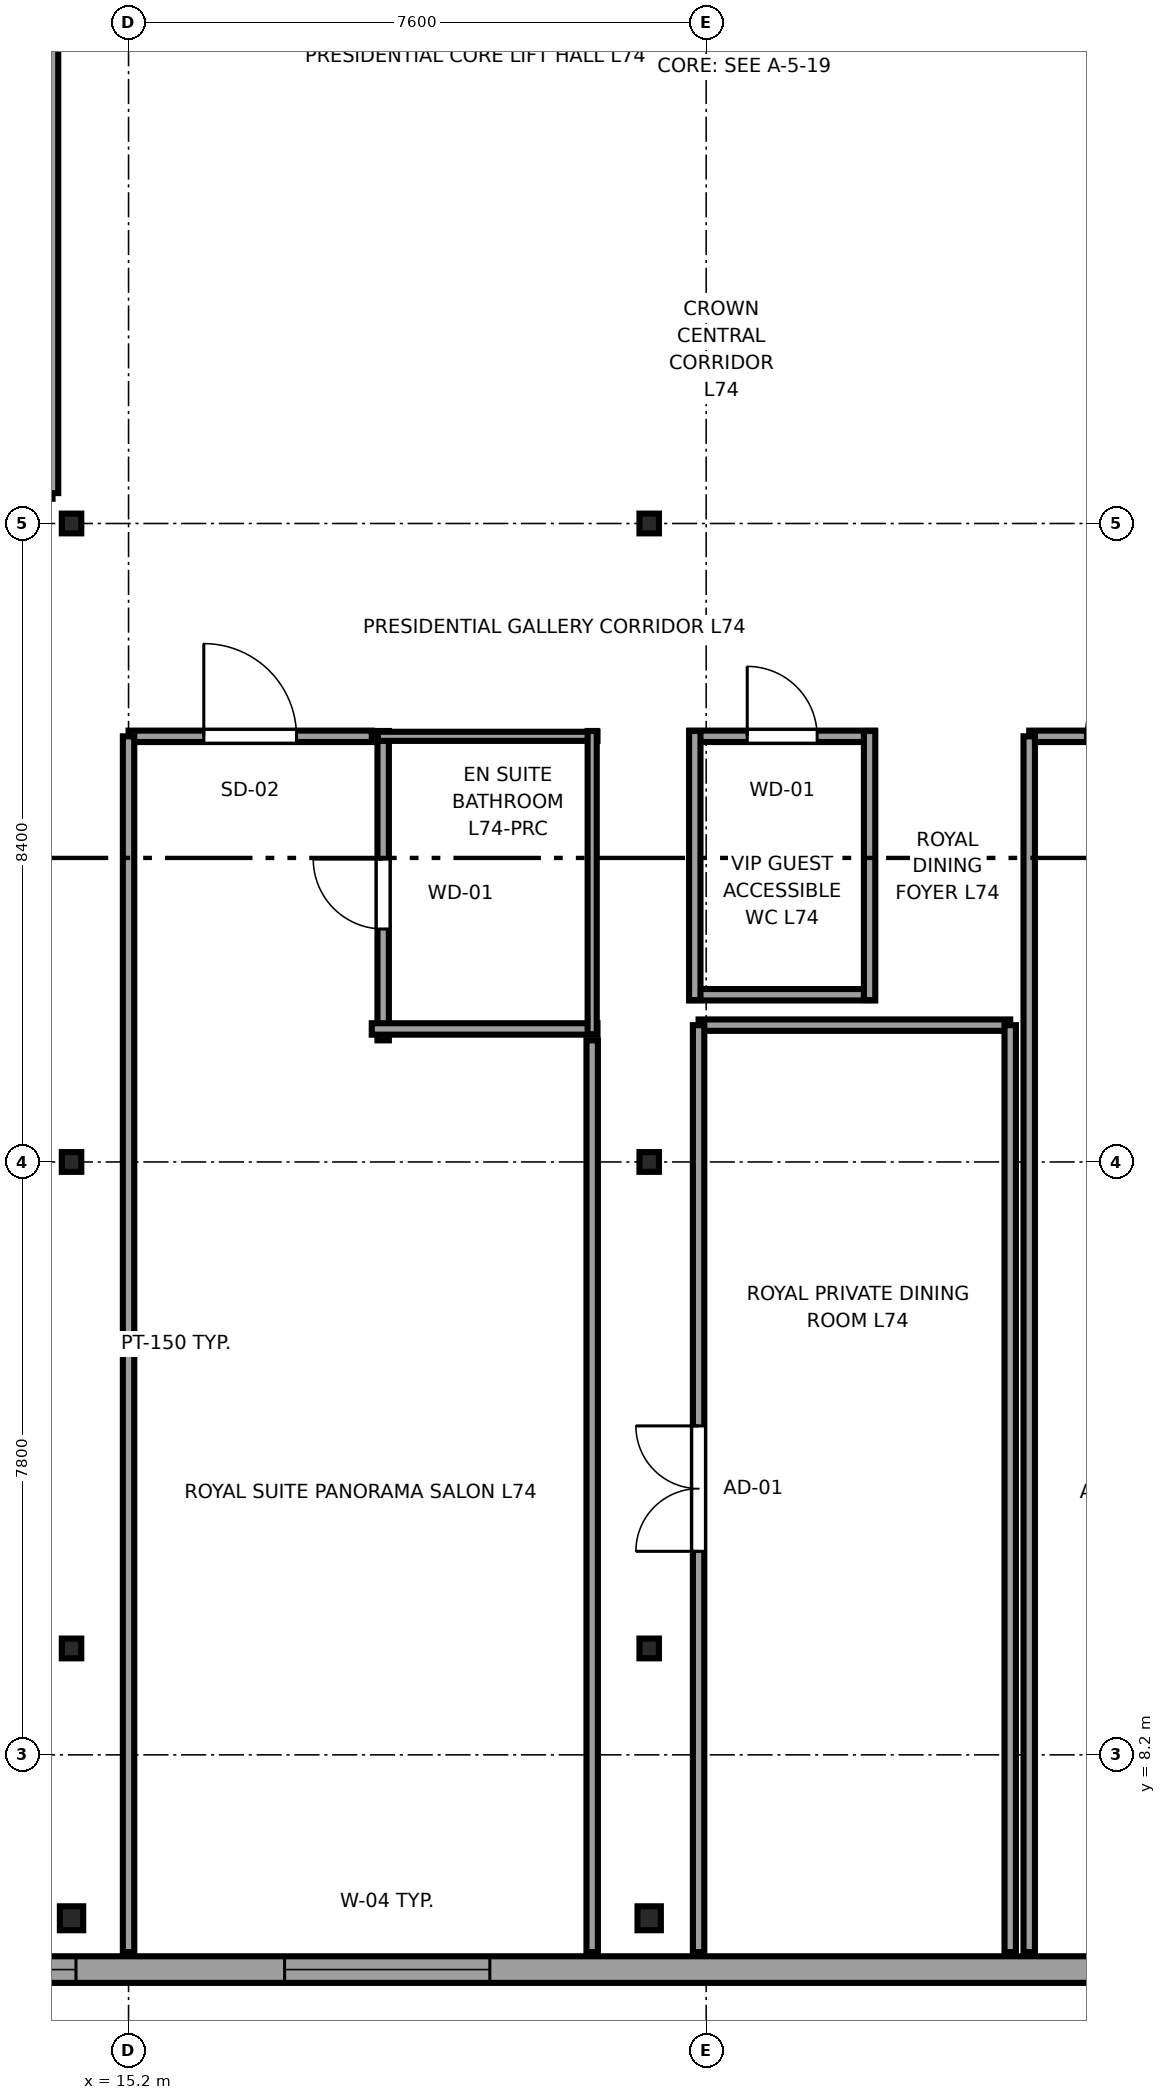
"""IFC4 building model, lengths in metres.
Left out: names, types, materials, properties, quantities, classifications, styles, units other than length and angle.
Written with IfcOpenShell. Run it as: python <this file> out.ifc"""

import sys

from ifc_helpers import new_model, si_unit, direction, frame, frame_2d, origin, origin_2d, place, context, subcontext, project, spatial, rectangle, i_section, extrude, source, transform, mapped, element, fill, save


model = new_model("IFC4")
c1 = context("Model", 3, precision=1e-05, world=origin(), true_north=direction((0.0, 1.0)))
c2 = subcontext(c1, "Body", "Model", "MODEL_VIEW")
j1 = project(units=[si_unit("LENGTHUNIT", "METRE"), si_unit("PLANEANGLEUNIT", "RADIAN")], contexts=[c1])
p1 = place(None, origin())
s1 = spatial("IfcSite", under=j1, at=p1, CompositionType="ELEMENT")
p2 = place(p1, origin())
s2 = spatial("IfcBuilding", under=s1, at=p2, CompositionType="ELEMENT")
p3 = place(p2, frame((0.0, 0.0, 278.6)))
s3 = spatial("IfcBuildingStorey", under=s2, at=p3, CompositionType="ELEMENT", Elevation=278.6)
m1 = source(origin(), c2, "Body", "SweptSolid", [
    extrude(i_section(OverallWidth=0.307, OverallDepth=0.315, WebThickness=0.012, FlangeThickness=0.019, FilletRadius=0.017, at=origin_2d()), origin(), (0.0, 0.0, 1.0), 3.55),
])
p4 = place(p3, frame((14.45, 6.05, 0.0), z_axis=(0.0, 0.0, 1.0), x_axis=(1.0, 0.0, 0.0)))
e1 = element("IfcColumn", 1, at=p4, inside=s3, PredefinedType="COLUMN", context=c2, shape_type="MappedRepresentation", body=[
    mapped(m1, transform((0.0, 0.0, 0.0), x_axis=(1.0, 0.0, 0.0), y_axis=(0.0, 1.0, 0.0), z_axis=(0.0, 0.0, 1.0), scale=1.0)),
])
m2 = source(origin(), c2, "Body", "SweptSolid", [
    extrude(i_section(OverallWidth=0.256, OverallDepth=0.26, WebThickness=0.01, FlangeThickness=0.017, FilletRadius=0.014, at=origin_2d()), origin(), (0.0, 0.0, 1.0), 3.55),
])
for number, where, z_axis, x_axis in (
    (2, (14.45, 9.6, 0.0), (0.0, 0.0, 1.0), (1.0, 0.0, 0.0)),
    (3, (14.45, 16.0, 0.0), (0.0, 0.0, 1.0), (1.0, 0.0, 0.0)),
    (4, (14.45, 24.4, 0.0), (0.0, 0.0, 1.0), (1.0, 0.0, 0.0)),
):
    element("IfcColumn", number, at=place(p3, frame(where, z_axis=z_axis, x_axis=x_axis)), inside=s3, PredefinedType="COLUMN", context=c2, shape_type="MappedRepresentation", body=[
        mapped(m2, transform((0.0, 0.0, 0.0), x_axis=(1.0, 0.0, 0.0), y_axis=(0.0, 1.0, 0.0), z_axis=(0.0, 0.0, 1.0), scale=1.0)),
    ])
p5 = place(p3, frame((22.05, 6.05, 0.0), z_axis=(0.0, 0.0, 1.0), x_axis=(1.0, 0.0, 0.0)))
e5 = element("IfcColumn", 5, at=p5, inside=s3, PredefinedType="COLUMN", context=c2, shape_type="MappedRepresentation", body=[
    mapped(m1, transform((0.0, 0.0, 0.0), x_axis=(1.0, 0.0, 0.0), y_axis=(0.0, 1.0, 0.0), z_axis=(0.0, 0.0, 1.0), scale=1.0)),
])
for number, where, z_axis, x_axis in (
    (6, (22.05, 9.6, 0.0), (0.0, 0.0, 1.0), (1.0, 0.0, 0.0)),
    (7, (22.05, 16.0, 0.0), (0.0, 0.0, 1.0), (1.0, 0.0, 0.0)),
    (8, (22.05, 24.4, 0.0), (0.0, 0.0, 1.0), (1.0, 0.0, 0.0)),
):
    element("IfcColumn", number, at=place(p3, frame(where, z_axis=z_axis, x_axis=x_axis)), inside=s3, PredefinedType="COLUMN", context=c2, shape_type="MappedRepresentation", body=[
        mapped(m2, transform((0.0, 0.0, 0.0), x_axis=(1.0, 0.0, 0.0), y_axis=(0.0, 1.0, 0.0), z_axis=(0.0, 0.0, 1.0), scale=1.0)),
    ])
p6 = place(p3, frame((7.017, 5.375, 0.0), z_axis=(0.0, 0.0, 1.0), x_axis=(1.0, 0.0, 0.0)))
e9 = element("IfcWall", 9, at=p6, inside=s3, PredefinedType="SOLIDWALL", context=c2, shape_type="SweptSolid", body=[
    extrude(rectangle(XDim=27.566, YDim=0.35, at=frame_2d((13.783, 0.0))), origin(), (0.0, 0.0, 1.0), 3.33),
])
p7 = place(p6, frame((0.897, 0.0, 0.68)))
e10 = element("IfcOpeningElement", 10, at=p7, cuts=e9, PredefinedType="OPENING", context=c2, shape_type="SweptSolid", body=[
    extrude(rectangle(XDim=2.7, YDim=1.95, at=frame_2d((1.35, 0.975))), frame((0.0, 0.185, 0.0), z_axis=(0.0, -1.0, 0.0), x_axis=(1.0, 0.0, 0.0)), (0.0, 0.0, 1.0), 0.37),
])
p8 = place(p6, frame((4.791, 0.0, 0.68)))
e11 = element("IfcOpeningElement", 11, at=p8, cuts=e9, PredefinedType="OPENING", context=c2, shape_type="SweptSolid", body=[
    extrude(rectangle(XDim=2.7, YDim=1.95, at=frame_2d((1.35, 0.975))), frame((0.0, 0.185, 0.0), z_axis=(0.0, -1.0, 0.0), x_axis=(1.0, 0.0, 0.0)), (0.0, 0.0, 1.0), 0.37),
])
p9 = place(p6, frame((10.236, 0.0, 0.68)))
e12 = element("IfcOpeningElement", 12, at=p9, cuts=e9, PredefinedType="OPENING", context=c2, shape_type="SweptSolid", body=[
    extrude(rectangle(XDim=2.7, YDim=1.95, at=frame_2d((1.35, 0.975))), frame((0.0, 0.185, 0.0), z_axis=(0.0, -1.0, 0.0), x_axis=(1.0, 0.0, 0.0)), (0.0, 0.0, 1.0), 0.37),
])
p10 = place(p6, frame((22.368, 0.0, 0.68)))
e13 = element("IfcOpeningElement", 13, at=p10, cuts=e9, PredefinedType="OPENING", context=c2, shape_type="SweptSolid", body=[
    extrude(rectangle(XDim=2.7, YDim=1.95, at=frame_2d((1.35, 0.975))), frame((0.0, 0.185, 0.0), z_axis=(0.0, -1.0, 0.0), x_axis=(1.0, 0.0, 0.0)), (0.0, 0.0, 1.0), 0.37),
])
p11 = place(p3, frame((18.55, 17.6, 0.0), z_axis=(0.0, 0.0, 1.0), x_axis=(0.0, 1.0, 0.0)))
e14 = element("IfcWall", 14, at=p11, inside=s3, PredefinedType="PARTITIONING", context=c2, shape_type="SweptSolid", body=[
    extrude(rectangle(XDim=4.07, YDim=0.15, at=frame_2d((2.035, 0.0))), origin(), (0.0, 0.0, 1.0), 3.33),
])
p12 = place(p11, frame((1.465, 0.0, 0.0)))
e15 = element("IfcOpeningElement", 15, at=p12, cuts=e14, PredefinedType="OPENING", context=c2, shape_type="SweptSolid", body=[
    extrude(rectangle(XDim=0.92, YDim=2.01, at=frame_2d((0.46, 1.005))), frame((0.0, 0.085, 0.0), z_axis=(0.0, -1.0, 0.0), x_axis=(1.0, 0.0, 0.0)), (0.0, 0.0, 1.0), 0.17),
])
p13 = place(p3, frame((18.4, 17.75, 0.0), z_axis=(0.0, 0.0, 1.0), x_axis=(1.0, 0.0, 0.0)))
e16 = element("IfcWall", 16, at=p13, inside=s3, PredefinedType="PARTITIONING", context=c2, shape_type="SweptSolid", body=[
    extrude(rectangle(XDim=2.97, YDim=0.15, at=frame_2d((1.485, 0.0))), origin(), (0.0, 0.0, 1.0), 3.33),
])
p14 = place(p3, frame((18.48, 21.6, 0.0), z_axis=(0.0, 0.0, 1.0), x_axis=(1.0, 0.0, 0.0)))
e17 = element("IfcWall", 17, at=p14, inside=s3, PredefinedType="PLUMBINGWALL", context=c2, shape_type="SweptSolid", body=[
    extrude(rectangle(XDim=2.89, YDim=0.12, at=frame_2d((1.445, 0.0))), origin(), (0.0, 0.0, 1.0), 3.33),
])
p15 = place(p3, frame((21.3, 17.68, 0.0), z_axis=(0.0, 0.0, 1.0), x_axis=(0.0, 1.0, 0.0)))
e18 = element("IfcWall", 18, at=p15, inside=s3, PredefinedType="PLUMBINGWALL", context=c2, shape_type="SweptSolid", body=[
    extrude(rectangle(XDim=3.99, YDim=0.12, at=frame_2d((1.995, 0.0))), origin(), (0.0, 0.0, 1.0), 3.33),
])
p16 = place(p3, frame((15.2, 21.6, 0.0), z_axis=(0.0, 0.0, 1.0), x_axis=(1.0, 0.0, 0.0)))
e19 = element("IfcWall", 19, at=p16, inside=s3, PredefinedType="PARTITIONING", context=c2, shape_type="SweptSolid", body=[
    extrude(rectangle(XDim=3.2, YDim=0.15, at=frame_2d((1.6, 0.0))), origin(), (0.0, 0.0, 1.0), 3.33),
])
p17 = place(p16, frame((0.99, 0.0, 0.0)))
e20 = element("IfcOpeningElement", 20, at=p17, cuts=e19, PredefinedType="OPENING", context=c2, shape_type="SweptSolid", body=[
    extrude(rectangle(XDim=1.22, YDim=2.08, at=frame_2d((0.61, 1.04))), frame((0.0, 0.085, 0.0), z_axis=(0.0, -1.0, 0.0), x_axis=(1.0, 0.0, 0.0)), (0.0, 0.0, 1.0), 0.17),
])
p18 = place(p3, frame((21.3, 5.605, 0.0), z_axis=(0.0, 0.0, 1.0), x_axis=(0.0, 1.0, 0.0)))
e21 = element("IfcWall", 21, at=p18, inside=s3, PredefinedType="PARTITIONING", context=c2, shape_type="SweptSolid", body=[
    extrude(rectangle(XDim=11.995, YDim=0.15, at=frame_2d((5.998, 0.0))), origin(), (0.0, 0.0, 1.0), 3.33),
])
p19 = place(p3, frame((15.2, 5.605, 0.0), z_axis=(0.0, 0.0, 1.0), x_axis=(0.0, 1.0, 0.0)))
e22 = element("IfcWall", 22, at=p19, inside=s3, PredefinedType="PARTITIONING", context=c2, shape_type="SweptSolid", body=[
    extrude(rectangle(XDim=15.995, YDim=0.15, at=frame_2d((7.998, 0.0))), origin(), (0.0, 0.0, 1.0), 3.33),
])
p20 = place(p3, frame((22.7, 17.8, 0.0), z_axis=(0.0, 0.0, 1.0), x_axis=(1.0, 0.0, 0.0)))
e23 = element("IfcWall", 23, at=p20, inside=s3, PredefinedType="PARTITIONING", context=c2, shape_type="SweptSolid", body=[
    extrude(rectangle(XDim=4.1, YDim=0.15, at=frame_2d((2.05, 0.0))), origin(), (0.0, 0.0, 1.0), 3.33),
])
p21 = place(p3, frame((22.7, 5.605, 0.0), z_axis=(0.0, 0.0, 1.0), x_axis=(0.0, 1.0, 0.0)))
e24 = element("IfcWall", 24, at=p21, inside=s3, PredefinedType="PARTITIONING", context=c2, shape_type="SweptSolid", body=[
    extrude(rectangle(XDim=12.195, YDim=0.15, at=frame_2d((6.098, 0.0))), origin(), (0.0, 0.0, 1.0), 3.33),
])
p22 = place(p21, frame((5.272, 0.0, 0.0)))
e25 = element("IfcOpeningElement", 25, at=p22, cuts=e24, PredefinedType="OPENING", context=c2, shape_type="SweptSolid", body=[
    extrude(rectangle(XDim=1.65, YDim=2.15, at=frame_2d((0.825, 1.075))), frame((0.0, 0.085, 0.0), z_axis=(0.0, -1.0, 0.0), x_axis=(1.0, 0.0, 0.0)), (0.0, 0.0, 1.0), 0.17),
])
p23 = place(p3, frame((26.8, 5.605, 0.0), z_axis=(0.0, 0.0, 1.0), x_axis=(0.0, 1.0, 0.0)))
e26 = element("IfcWall", 26, at=p23, inside=s3, PredefinedType="PARTITIONING", context=c2, shape_type="SweptSolid", body=[
    extrude(rectangle(XDim=12.195, YDim=0.15, at=frame_2d((6.098, 0.0))), origin(), (0.0, 0.0, 1.0), 3.33),
])
p24 = place(p3, frame((27.05, 21.6, 0.0), z_axis=(0.0, 0.0, 1.0), x_axis=(1.0, 0.0, 0.0)))
e27 = element("IfcWall", 27, at=p24, inside=s3, PredefinedType="PARTITIONING", context=c2, shape_type="SweptSolid", body=[
    extrude(rectangle(XDim=2.7, YDim=0.15, at=frame_2d((1.35, 0.0))), origin(), (0.0, 0.0, 1.0), 3.33),
])
p25 = place(p24, frame((0.74, 0.0, 0.0)))
e28 = element("IfcOpeningElement", 28, at=p25, cuts=e27, PredefinedType="OPENING", context=c2, shape_type="SweptSolid", body=[
    extrude(rectangle(XDim=1.22, YDim=2.08, at=frame_2d((0.61, 1.04))), frame((0.0, 0.085, 0.0), z_axis=(0.0, -1.0, 0.0), x_axis=(1.0, 0.0, 0.0)), (0.0, 0.0, 1.0), 0.17),
])
p26 = place(p3, frame((27.05, 5.605, 0.0), z_axis=(0.0, 0.0, 1.0), x_axis=(0.0, 1.0, 0.0)))
e29 = element("IfcWall", 29, at=p26, inside=s3, PredefinedType="PARTITIONING", context=c2, shape_type="SweptSolid", body=[
    extrude(rectangle(XDim=15.995, YDim=0.15, at=frame_2d((7.998, 0.0))), origin(), (0.0, 0.0, 1.0), 3.33),
])
p27 = place(p3, frame((9.88, 24.8, 0.0), z_axis=(0.0, 0.0, 1.0), x_axis=(1.0, 0.0, 0.0)))
e30 = element("IfcWall", 30, at=p27, inside=s3, PredefinedType="PARTITIONING", context=c2, shape_type="SweptSolid", body=[
    extrude(rectangle(XDim=4.32, YDim=0.15, at=frame_2d((2.16, 0.0))), origin(), (0.0, 0.0, 1.0), 3.33),
])
p28 = place(p3, frame((14.2, 24.8, 0.0), z_axis=(0.0, 0.0, 1.0), x_axis=(0.0, 1.0, 0.0)))
e31 = element("IfcWall", 31, at=p28, inside=s3, PredefinedType="PARTITIONING", context=c2, shape_type="SweptSolid", body=[
    extrude(rectangle(XDim=6.55, YDim=0.15, at=frame_2d((3.275, 0.0))), origin(), (0.0, 0.0, 1.0), 3.33),
])
p29 = place(p3, frame((22.58, 18.2, 0.0), z_axis=(0.0, 0.0, 1.0), x_axis=(1.0, 0.0, 0.0)))
e32 = element("IfcWall", 32, at=p29, inside=s3, PredefinedType="PARTITIONING", context=c2, shape_type="SweptSolid", body=[
    extrude(rectangle(XDim=2.44, YDim=0.15, at=frame_2d((1.22, 0.0))), origin(), (0.0, 0.0, 1.0), 3.33),
])
p30 = place(p3, frame((22.58, 21.6, 0.0), z_axis=(0.0, 0.0, 1.0), x_axis=(1.0, 0.0, 0.0)))
e33 = element("IfcWall", 33, at=p30, inside=s3, PredefinedType="PARTITIONING", context=c2, shape_type="SweptSolid", body=[
    extrude(rectangle(XDim=2.44, YDim=0.15, at=frame_2d((1.22, 0.0))), origin(), (0.0, 0.0, 1.0), 3.33),
])
p31 = place(p30, frame((0.76, 0.0, 0.0)))
e34 = element("IfcOpeningElement", 34, at=p31, cuts=e33, PredefinedType="OPENING", context=c2, shape_type="SweptSolid", body=[
    extrude(rectangle(XDim=0.92, YDim=2.01, at=frame_2d((0.46, 1.005))), frame((0.0, 0.085, 0.0), z_axis=(0.0, -1.0, 0.0), x_axis=(1.0, 0.0, 0.0)), (0.0, 0.0, 1.0), 0.17),
])
for number, where, z_axis, x_axis in (
    (35, (22.65, 18.13, 0.0), (0.0, 0.0, 1.0), (0.0, 1.0, 0.0)),
    (36, (24.95, 18.13, 0.0), (0.0, 0.0, 1.0), (0.0, 1.0, 0.0)),
):
    element("IfcWall", number, at=place(p3, frame(where, z_axis=z_axis, x_axis=x_axis)), inside=s3, PredefinedType="PARTITIONING", context=c2, shape_type="SweptSolid", body=[
        extrude(rectangle(XDim=3.54, YDim=0.15, at=frame_2d((1.77, 0.0))), origin(), (0.0, 0.0, 1.0), 3.33),
    ])
m3 = source(origin(), c2, "Body", "SweptSolid", [
    extrude(rectangle(XDim=2.7, YDim=1.95, at=frame_2d((1.35, 0.975))), frame((0.0, 0.09, 0.0), z_axis=(0.0, -1.0, 0.0), x_axis=(1.0, 0.0, 0.0)), (0.0, 0.0, 1.0), 0.06),
])
p32 = place(p8, origin())
e37 = element("IfcWindow", 37, at=p32, inside=s3, PartitioningType="TRIPLE_PANEL_HORIZONTAL", PredefinedType="WINDOW", context=c2, shape_type="MappedRepresentation", body=[
    mapped(m3, transform((0.0, 0.0, 0.0), x_axis=(1.0, 0.0, 0.0), y_axis=(0.0, 1.0, 0.0), z_axis=(0.0, 0.0, 1.0), scale=1.0)),
])
fill(e11, e37)
p33 = place(p9, origin())
e38 = element("IfcWindow", 38, at=p33, inside=s3, PartitioningType="TRIPLE_PANEL_HORIZONTAL", PredefinedType="WINDOW", context=c2, shape_type="MappedRepresentation", body=[
    mapped(m3, transform((0.0, 0.0, 0.0), x_axis=(1.0, 0.0, 0.0), y_axis=(0.0, 1.0, 0.0), z_axis=(0.0, 0.0, 1.0), scale=1.0)),
])
fill(e12, e38)
m4 = source(origin(), c2, "Body", "SweptSolid", [
    extrude(rectangle(XDim=0.92, YDim=2.01, at=frame_2d((0.46, 1.005))), frame((0.0, 0.025, 0.0), z_axis=(0.0, -1.0, 0.0), x_axis=(1.0, 0.0, 0.0)), (0.0, 0.0, 1.0), 0.05),
])
p34 = place(p12, origin())
e39 = element("IfcDoor", 39, at=p34, inside=s3, OperationType="SINGLE_SWING_RIGHT", PredefinedType="DOOR", context=c2, shape_type="MappedRepresentation", body=[
    mapped(m4, transform((0.0, 0.0, 0.0), x_axis=(1.0, 0.0, 0.0), y_axis=(0.0, 1.0, 0.0), z_axis=(0.0, 0.0, 1.0), scale=1.0)),
])
fill(e15, e39)
m5 = source(origin(), c2, "Body", "SweptSolid", [
    extrude(rectangle(XDim=1.22, YDim=2.08, at=frame_2d((0.61, 1.04))), frame((0.0, 0.025, 0.0), z_axis=(0.0, -1.0, 0.0), x_axis=(1.0, 0.0, 0.0)), (0.0, 0.0, 1.0), 0.05),
])
p35 = place(p17, origin())
e40 = element("IfcDoor", 40, at=p35, inside=s3, OperationType="SINGLE_SWING_LEFT", PredefinedType="DOOR", context=c2, shape_type="MappedRepresentation", body=[
    mapped(m5, transform((0.0, 0.0, 0.0), x_axis=(1.0, 0.0, 0.0), y_axis=(0.0, 1.0, 0.0), z_axis=(0.0, 0.0, 1.0), scale=1.0)),
])
fill(e20, e40)
m6 = source(origin(), c2, "Body", "SweptSolid", [
    extrude(rectangle(XDim=1.65, YDim=2.15, at=frame_2d((0.825, 1.075))), frame((0.0, 0.025, 0.0), z_axis=(0.0, -1.0, 0.0), x_axis=(1.0, 0.0, 0.0)), (0.0, 0.0, 1.0), 0.05),
])
p36 = place(p22, origin())
e41 = element("IfcDoor", 41, at=p36, inside=s3, OperationType="DOUBLE_DOOR_SINGLE_SWING", PredefinedType="DOOR", context=c2, shape_type="MappedRepresentation", body=[
    mapped(m6, transform((0.0, 0.0, 0.0), x_axis=(1.0, 0.0, 0.0), y_axis=(0.0, 1.0, 0.0), z_axis=(0.0, 0.0, 1.0), scale=1.0)),
])
fill(e25, e41)
p37 = place(p25, origin())
e42 = element("IfcDoor", 42, at=p37, inside=s3, OperationType="SINGLE_SWING_RIGHT", PredefinedType="DOOR", context=c2, shape_type="MappedRepresentation", body=[
    mapped(m5, transform((0.0, 0.0, 0.0), x_axis=(1.0, 0.0, 0.0), y_axis=(0.0, 1.0, 0.0), z_axis=(0.0, 0.0, 1.0), scale=1.0)),
])
fill(e28, e42)
p38 = place(p31, origin())
e43 = element("IfcDoor", 43, at=p38, inside=s3, OperationType="SINGLE_SWING_LEFT", PredefinedType="DOOR", context=c2, shape_type="MappedRepresentation", body=[
    mapped(m4, transform((0.0, 0.0, 0.0), x_axis=(1.0, 0.0, 0.0), y_axis=(0.0, 1.0, 0.0), z_axis=(0.0, 0.0, 1.0), scale=1.0)),
])
fill(e34, e43)
save(model, sys.argv[1])
